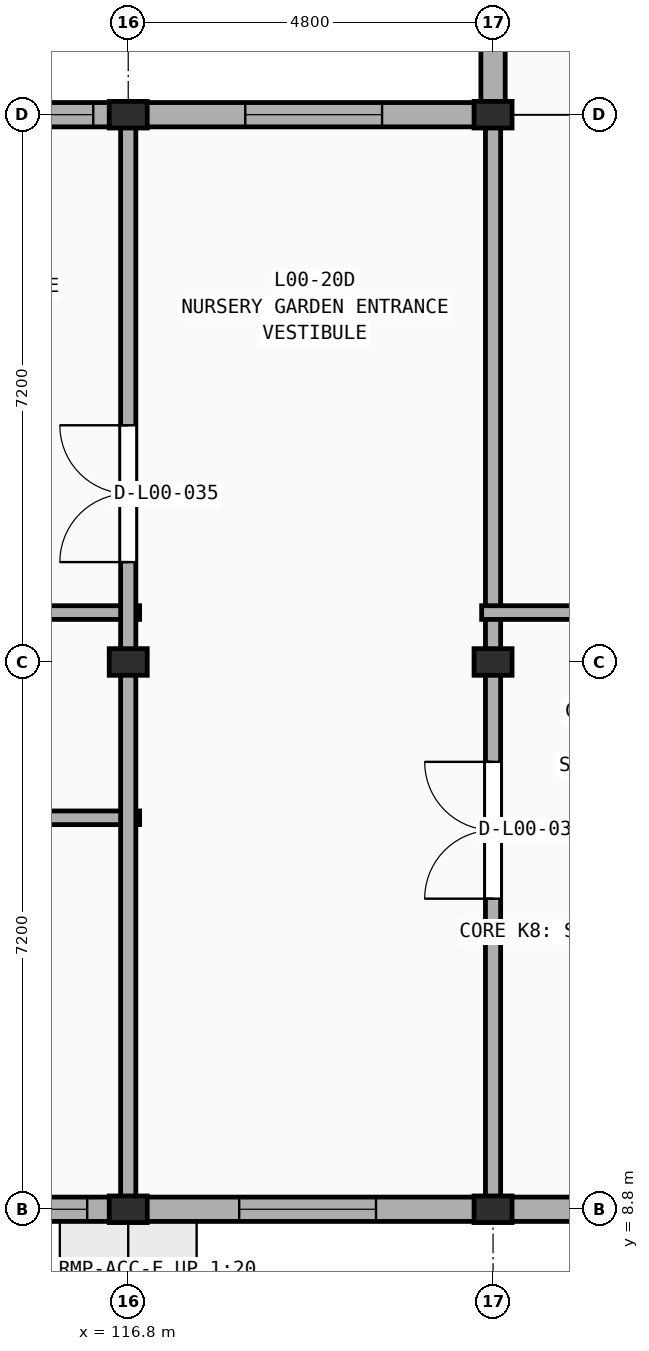
"""IFC4 building model, lengths in metres.
Left out: names, types, materials, properties, quantities, classifications, styles, units other than length and angle.
Written with IfcOpenShell. Run it as: python <this file> out.ifc"""

import sys

from ifc_helpers import new_model, si_unit, direction, frame, frame_2d, origin, origin_2d, place, context, subcontext, project, spatial, rectangle, extrude, element, fill, save


model = new_model("IFC4")
c1 = context("Model", 3, precision=1e-05, world=origin(), true_north=direction((0.0, 1.0)))
c2 = subcontext(c1, "Body", "Model", "MODEL_VIEW")
j1 = project(units=[si_unit("LENGTHUNIT", "METRE"), si_unit("PLANEANGLEUNIT", "RADIAN")], contexts=[c1])
p1 = place(None, origin())
s1 = spatial("IfcSite", under=j1, at=p1, CompositionType="ELEMENT")
p2 = place(p1, origin())
s2 = spatial("IfcBuilding", under=s1, at=p2, CompositionType="ELEMENT")
p3 = place(p2, origin())
s3 = spatial("IfcBuildingStorey", under=s2, at=p3, CompositionType="ELEMENT", Elevation=0.0)
for number, where, z_axis, x_axis in (
    (1, (116.8, 8.8, 0.0), (0.0, 0.0, 1.0), (1.0, 0.0, 0.0)),
    (2, (116.8, 16.0, 0.0), (0.0, 0.0, 1.0), (1.0, 0.0, 0.0)),
    (3, (116.8, 23.2, 0.0), (0.0, 0.0, 1.0), (1.0, 0.0, 0.0)),
    (4, (121.6, 8.8, 0.0), (0.0, 0.0, 1.0), (1.0, 0.0, 0.0)),
    (5, (121.6, 16.0, 0.0), (0.0, 0.0, 1.0), (1.0, 0.0, 0.0)),
    (6, (121.6, 23.2, 0.0), (0.0, 0.0, 1.0), (1.0, 0.0, 0.0)),
):
    element("IfcColumn", number, at=place(p3, frame(where, z_axis=z_axis, x_axis=x_axis)), inside=s3, PredefinedType="PILASTER", context=c2, shape_type="SweptSolid", body=[
        extrude(rectangle(XDim=0.5, YDim=0.35, at=origin_2d()), origin(), (0.0, 0.0, 1.0), 5.4),
    ])
p4 = place(p3, frame((105.5, 13.95, 0.0), z_axis=(0.0, 0.0, 1.0), x_axis=(1.0, 0.0, 0.0)))
e7 = element("IfcWall", 7, at=p4, inside=s3, PredefinedType="PARTITIONING", context=c2, shape_type="SweptSolid", body=[
    extrude(rectangle(XDim=11.45, YDim=0.18, at=frame_2d((5.725, 0.0))), origin(), (0.0, 0.0, 1.0), 4.64),
])
p5 = place(p4, frame((5.225, 0.0, -0.01)))
e8 = element("IfcOpeningElement", 8, at=p5, cuts=e7, PredefinedType="OPENING", context=c2, shape_type="SweptSolid", body=[
    extrude(rectangle(XDim=1.0, YDim=2.16, at=frame_2d((0.5, 1.08))), frame((0.0, 0.1, 0.0), z_axis=(0.0, -1.0, 0.0), x_axis=(1.0, 0.0, 0.0)), (0.0, 0.0, 1.0), 0.2),
])
p6 = place(p3, frame((112.3, 16.65, 0.0), z_axis=(0.0, 0.0, 1.0), x_axis=(1.0, 0.0, 0.0)))
e9 = element("IfcWall", 9, at=p6, inside=s3, PredefinedType="PARTITIONING", context=c2, shape_type="SweptSolid", body=[
    extrude(rectangle(XDim=4.65, YDim=0.18, at=frame_2d((2.325, 0.0))), origin(), (0.0, 0.0, 1.0), 4.64),
])
p7 = place(p6, frame((1.825, 0.0, -0.01)))
e10 = element("IfcOpeningElement", 10, at=p7, cuts=e9, PredefinedType="OPENING", context=c2, shape_type="SweptSolid", body=[
    extrude(rectangle(XDim=1.0, YDim=2.16, at=frame_2d((0.5, 1.08))), frame((0.0, 0.1, 0.0), z_axis=(0.0, -1.0, 0.0), x_axis=(1.0, 0.0, 0.0)), (0.0, 0.0, 1.0), 0.2),
])
p8 = place(p3, frame((116.8, 8.95, 0.0), z_axis=(0.0, 0.0, 1.0), x_axis=(0.0, 1.0, 0.0)))
e11 = element("IfcWall", 11, at=p8, inside=s3, PredefinedType="PARTITIONING", context=c2, shape_type="SweptSolid", body=[
    extrude(rectangle(XDim=14.1, YDim=0.2, at=frame_2d((7.05, 0.0))), origin(), (0.0, 0.0, 1.0), 3.99),
])
p9 = place(p8, frame((8.364, 0.0, -0.01)))
e12 = element("IfcOpeningElement", 12, at=p9, cuts=e11, PredefinedType="OPENING", context=c2, shape_type="SweptSolid", body=[
    extrude(rectangle(XDim=1.8, YDim=2.26, at=frame_2d((0.9, 1.13))), frame((0.0, 0.11, 0.0), z_axis=(0.0, -1.0, 0.0), x_axis=(1.0, 0.0, 0.0)), (0.0, 0.0, 1.0), 0.22),
])
p10 = place(p3, frame((121.6, 8.95, 0.0), z_axis=(0.0, 0.0, 1.0), x_axis=(0.0, 1.0, 0.0)))
e13 = element("IfcWall", 13, at=p10, inside=s3, PredefinedType="PARTITIONING", context=c2, shape_type="SweptSolid", body=[
    extrude(rectangle(XDim=14.1, YDim=0.2, at=frame_2d((7.05, 0.0))), origin(), (0.0, 0.0, 1.0), 3.99),
])
p11 = place(p10, frame((3.936, 0.0, -0.01)))
e14 = element("IfcOpeningElement", 14, at=p11, cuts=e13, PredefinedType="OPENING", context=c2, shape_type="SweptSolid", body=[
    extrude(rectangle(XDim=1.8, YDim=2.26, at=frame_2d((0.9, 1.13))), frame((0.0, 0.11, 0.0), z_axis=(0.0, -1.0, 0.0), x_axis=(1.0, 0.0, 0.0)), (0.0, 0.0, 1.0), 0.22),
])
p12 = place(p3, frame((121.45, 16.65, 0.0), z_axis=(0.0, 0.0, 1.0), x_axis=(1.0, 0.0, 0.0)))
e15 = element("IfcWall", 15, at=p12, inside=s3, PredefinedType="PARTITIONING", context=c2, shape_type="SweptSolid", body=[
    extrude(rectangle(XDim=15.1, YDim=0.18, at=frame_2d((7.55, 0.0))), origin(), (0.0, 0.0, 1.0), 4.64),
])
p13 = place(p12, frame((4.512, 0.0, -0.01)))
e16 = element("IfcOpeningElement", 16, at=p13, cuts=e15, PredefinedType="OPENING", context=c2, shape_type="SweptSolid", body=[
    extrude(rectangle(XDim=1.0, YDim=2.16, at=frame_2d((0.5, 1.08))), frame((0.0, 0.1, 0.0), z_axis=(0.0, -1.0, 0.0), x_axis=(1.0, 0.0, 0.0)), (0.0, 0.0, 1.0), 0.2),
])
p14 = place(p3, frame((108.4, 8.8, 0.0), z_axis=(0.0, 0.0, 1.0), x_axis=(1.0, 0.0, 0.0)))
e17 = element("IfcWall", 17, at=p14, inside=s3, PredefinedType="SOLIDWALL", context=c2, shape_type="SweptSolid", body=[
    extrude(rectangle(XDim=8.4, YDim=0.32, at=frame_2d((4.2, 0.0))), origin(), (0.0, 0.0, 1.0), 3.99),
])
p15 = place(p14, frame((0.46, 0.0, 0.9)))
e18 = element("IfcOpeningElement", 18, at=p15, cuts=e17, PredefinedType="OPENING", context=c2, shape_type="SweptSolid", body=[
    extrude(rectangle(XDim=2.4, YDim=2.35, at=frame_2d((1.2, 1.175))), frame((0.0, 0.17, 0.0), z_axis=(0.0, -1.0, 0.0), x_axis=(1.0, 0.0, 0.0)), (0.0, 0.0, 1.0), 0.34),
])
p16 = place(p14, frame((5.46, 0.0, 0.9)))
e19 = element("IfcOpeningElement", 19, at=p16, cuts=e17, PredefinedType="OPENING", context=c2, shape_type="SweptSolid", body=[
    extrude(rectangle(XDim=2.4, YDim=2.35, at=frame_2d((1.2, 1.175))), frame((0.0, 0.17, 0.0), z_axis=(0.0, -1.0, 0.0), x_axis=(1.0, 0.0, 0.0)), (0.0, 0.0, 1.0), 0.34),
])
p17 = place(p3, frame((116.8, 23.2, 0.0), z_axis=(0.0, 0.0, 1.0), x_axis=(-1.0, 0.0, 0.0)))
e20 = element("IfcWall", 20, at=p17, inside=s3, PredefinedType="SOLIDWALL", context=c2, shape_type="SweptSolid", body=[
    extrude(rectangle(XDim=8.4, YDim=0.32, at=frame_2d((4.2, 0.0))), origin(), (0.0, 0.0, 1.0), 3.99),
])
p18 = place(p17, frame((0.46, 0.0, 0.9)))
e21 = element("IfcOpeningElement", 21, at=p18, cuts=e20, PredefinedType="OPENING", context=c2, shape_type="SweptSolid", body=[
    extrude(rectangle(XDim=2.4, YDim=2.35, at=frame_2d((1.2, 1.175))), frame((0.0, 0.17, 0.0), z_axis=(0.0, -1.0, 0.0), x_axis=(1.0, 0.0, 0.0)), (0.0, 0.0, 1.0), 0.34),
])
p19 = place(p17, frame((5.46, 0.0, 0.9)))
e22 = element("IfcOpeningElement", 22, at=p19, cuts=e20, PredefinedType="OPENING", context=c2, shape_type="SweptSolid", body=[
    extrude(rectangle(XDim=2.4, YDim=2.35, at=frame_2d((1.2, 1.175))), frame((0.0, 0.17, 0.0), z_axis=(0.0, -1.0, 0.0), x_axis=(1.0, 0.0, 0.0)), (0.0, 0.0, 1.0), 0.34),
])
p20 = place(p3, frame((121.6, 8.8, 0.0), z_axis=(0.0, 0.0, 1.0), x_axis=(1.0, 0.0, 0.0)))
e23 = element("IfcWall", 23, at=p20, inside=s3, PredefinedType="SOLIDWALL", context=c2, shape_type="SweptSolid", body=[
    extrude(rectangle(XDim=7.8, YDim=0.32, at=frame_2d((3.9, 0.0))), origin(), (0.0, 0.0, 1.0), 3.99),
])
p21 = place(p20, frame((4.06, 0.0, 0.9)))
e24 = element("IfcOpeningElement", 24, at=p21, cuts=e23, PredefinedType="OPENING", context=c2, shape_type="SweptSolid", body=[
    extrude(rectangle(XDim=2.4, YDim=2.35, at=frame_2d((1.2, 1.175))), frame((0.0, 0.17, 0.0), z_axis=(0.0, -1.0, 0.0), x_axis=(1.0, 0.0, 0.0)), (0.0, 0.0, 1.0), 0.34),
])
p22 = place(p3, frame((121.6, 30.4, 0.0), z_axis=(0.0, 0.0, 1.0), x_axis=(0.0, -1.0, 0.0)))
e25 = element("IfcWall", 25, at=p22, inside=s3, PredefinedType="SOLIDWALL", context=c2, shape_type="SweptSolid", body=[
    extrude(rectangle(XDim=7.2, YDim=0.32, at=frame_2d((3.6, 0.0))), origin(), (0.0, 0.0, 1.0), 3.99),
])
p23 = place(p22, frame((2.6, 0.0, -0.01)))
e26 = element("IfcOpeningElement", 26, at=p23, cuts=e25, PredefinedType="OPENING", context=c2, shape_type="SweptSolid", body=[
    extrude(rectangle(XDim=2.0, YDim=2.41, at=frame_2d((1.0, 1.205))), frame((0.0, 0.17, 0.0), z_axis=(0.0, -1.0, 0.0), x_axis=(1.0, 0.0, 0.0)), (0.0, 0.0, 1.0), 0.34),
])
p24 = place(p3, frame((116.8, 8.8, 0.0), z_axis=(0.0, 0.0, 1.0), x_axis=(1.0, 0.0, 0.0)))
e27 = element("IfcWall", 27, at=p24, inside=s3, PredefinedType="SOLIDWALL", context=c2, shape_type="SweptSolid", body=[
    extrude(rectangle(XDim=4.8, YDim=0.32, at=frame_2d((2.4, 0.0))), origin(), (0.0, 0.0, 1.0), 3.99),
])
p25 = place(p24, frame((1.46, 0.0, 0.9)))
e28 = element("IfcOpeningElement", 28, at=p25, cuts=e27, PredefinedType="OPENING", context=c2, shape_type="SweptSolid", body=[
    extrude(rectangle(XDim=1.8, YDim=2.2, at=frame_2d((0.9, 1.1))), frame((0.0, 0.17, 0.0), z_axis=(0.0, -1.0, 0.0), x_axis=(1.0, 0.0, 0.0)), (0.0, 0.0, 1.0), 0.34),
])
p26 = place(p3, frame((121.6, 23.2, 0.0), z_axis=(0.0, 0.0, 1.0), x_axis=(-1.0, 0.0, 0.0)))
e29 = element("IfcWall", 29, at=p26, inside=s3, PredefinedType="SOLIDWALL", context=c2, shape_type="SweptSolid", body=[
    extrude(rectangle(XDim=4.8, YDim=0.32, at=frame_2d((2.4, 0.0))), origin(), (0.0, 0.0, 1.0), 3.99),
])
p27 = place(p26, frame((1.46, 0.0, 0.9)))
e30 = element("IfcOpeningElement", 30, at=p27, cuts=e29, PredefinedType="OPENING", context=c2, shape_type="SweptSolid", body=[
    extrude(rectangle(XDim=1.8, YDim=2.2, at=frame_2d((0.9, 1.1))), frame((0.0, 0.17, 0.0), z_axis=(0.0, -1.0, 0.0), x_axis=(1.0, 0.0, 0.0)), (0.0, 0.0, 1.0), 0.34),
])
p28 = place(p9, frame((0.0, 0.0, 0.01)))
e31 = element("IfcDoor", 31, at=p28, inside=s3, OperationType="DOUBLE_SWING_LEFT", PredefinedType="DOOR", context=c2, shape_type="SweptSolid", body=[
    extrude(rectangle(XDim=1.8, YDim=2.25, at=frame_2d((0.9, 1.125))), frame((0.0, 0.025, 0.0), z_axis=(0.0, -1.0, 0.0), x_axis=(1.0, 0.0, 0.0)), (0.0, 0.0, 1.0), 0.05),
])
fill(e12, e31)
p29 = place(p11, frame((1.8, 0.0, 0.01), z_axis=(0.0, 0.0, 1.0), x_axis=(-1.0, 0.0, 0.0)))
e32 = element("IfcDoor", 32, at=p29, inside=s3, OperationType="DOUBLE_SWING_LEFT", PredefinedType="DOOR", context=c2, shape_type="SweptSolid", body=[
    extrude(rectangle(XDim=1.8, YDim=2.25, at=frame_2d((0.9, 1.125))), frame((0.0, 0.025, 0.0), z_axis=(0.0, -1.0, 0.0), x_axis=(1.0, 0.0, 0.0)), (0.0, 0.0, 1.0), 0.05),
])
fill(e14, e32)
p30 = place(p16, origin())
e33 = element("IfcWindow", 33, at=p30, inside=s3, PartitioningType="TRIPLE_PANEL_VERTICAL", PredefinedType="WINDOW", context=c2, shape_type="SweptSolid", body=[
    extrude(rectangle(XDim=2.4, YDim=2.35, at=frame_2d((1.2, 1.175))), frame((0.0, 0.03, 0.0), z_axis=(0.0, -1.0, 0.0), x_axis=(1.0, 0.0, 0.0)), (0.0, 0.0, 1.0), 0.06),
])
fill(e19, e33)
p31 = place(p18, origin())
e34 = element("IfcWindow", 34, at=p31, inside=s3, PartitioningType="TRIPLE_PANEL_VERTICAL", PredefinedType="WINDOW", context=c2, shape_type="SweptSolid", body=[
    extrude(rectangle(XDim=2.4, YDim=2.35, at=frame_2d((1.2, 1.175))), frame((0.0, 0.03, 0.0), z_axis=(0.0, -1.0, 0.0), x_axis=(1.0, 0.0, 0.0)), (0.0, 0.0, 1.0), 0.06),
])
fill(e21, e34)
p32 = place(p25, origin())
e35 = element("IfcWindow", 35, at=p32, inside=s3, PartitioningType="DOUBLE_PANEL_VERTICAL", PredefinedType="WINDOW", context=c2, shape_type="SweptSolid", body=[
    extrude(rectangle(XDim=1.8, YDim=2.2, at=frame_2d((0.9, 1.1))), frame((0.0, 0.03, 0.0), z_axis=(0.0, -1.0, 0.0), x_axis=(1.0, 0.0, 0.0)), (0.0, 0.0, 1.0), 0.06),
])
fill(e28, e35)
p33 = place(p27, origin())
e36 = element("IfcWindow", 36, at=p33, inside=s3, PartitioningType="DOUBLE_PANEL_VERTICAL", PredefinedType="WINDOW", context=c2, shape_type="SweptSolid", body=[
    extrude(rectangle(XDim=1.8, YDim=2.2, at=frame_2d((0.9, 1.1))), frame((0.0, 0.03, 0.0), z_axis=(0.0, -1.0, 0.0), x_axis=(1.0, 0.0, 0.0)), (0.0, 0.0, 1.0), 0.06),
])
fill(e30, e36)
save(model, sys.argv[1])
